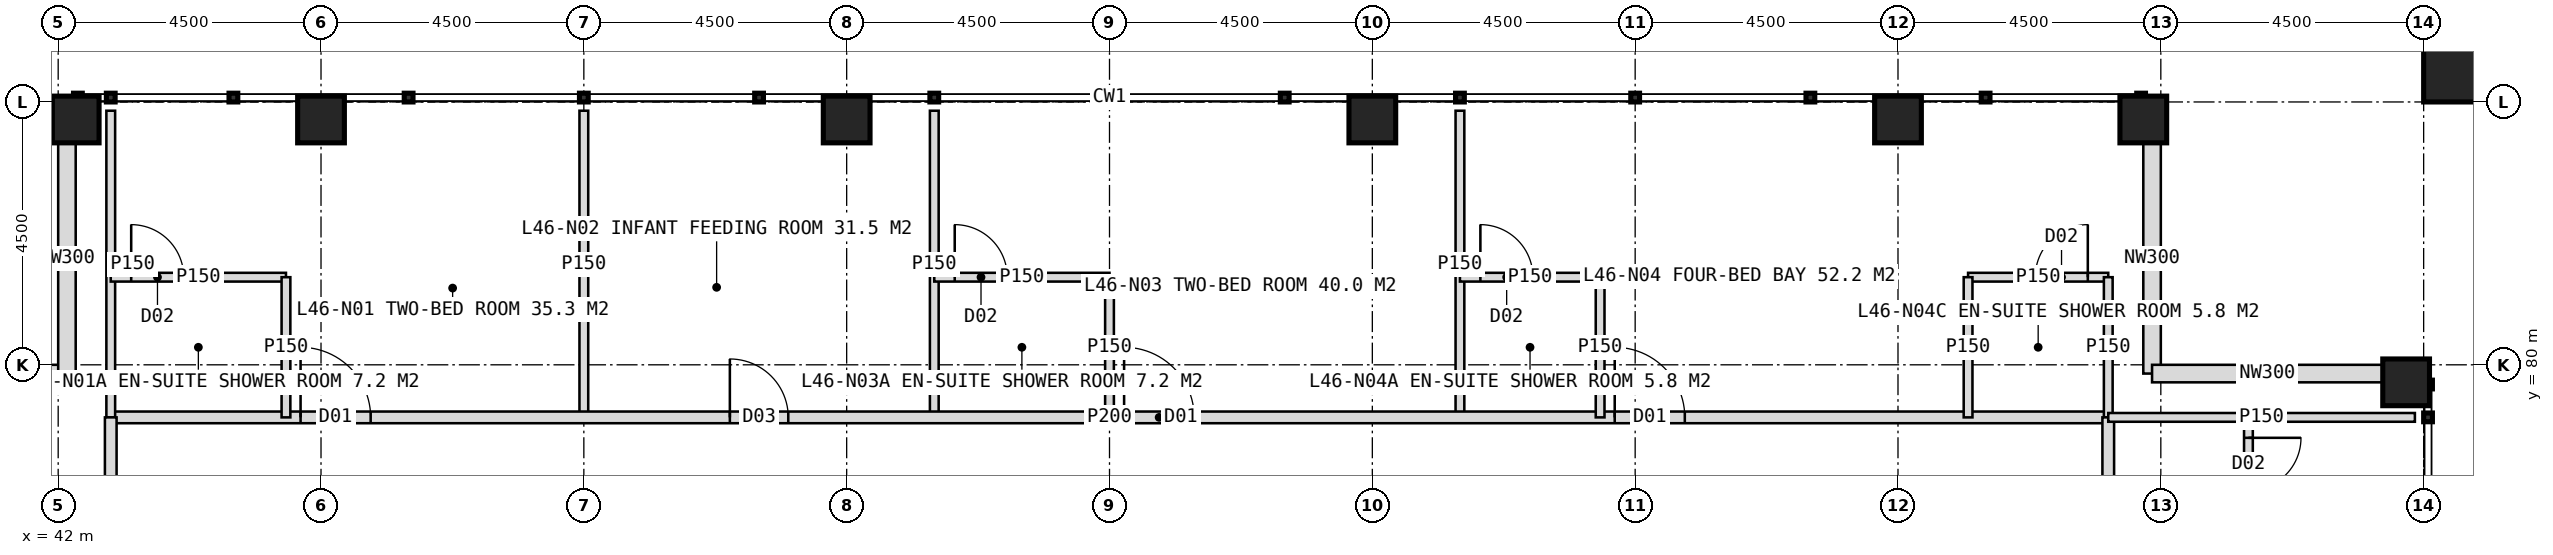
"""IFC4 building model, lengths in metres.
Left out: names, types, materials, properties, quantities, classifications, styles, units other than length and angle.
Written with IfcOpenShell. Run it as: python <this file> out.ifc"""

import sys

from ifc_helpers import new_model, si_unit, direction, frame, frame_2d, origin, origin_2d, place, context, subcontext, project, spatial, rectangle, hollow_rectangle, extrude, element, fill, save


model = new_model("IFC4")
c1 = context("Model", 3, precision=1e-05, world=origin(), true_north=direction((0.0, 1.0)))
c2 = subcontext(c1, "Body", "Model", "MODEL_VIEW")
j1 = project(units=[si_unit("LENGTHUNIT", "METRE"), si_unit("PLANEANGLEUNIT", "RADIAN")], contexts=[c1])
p1 = place(None, origin())
s1 = spatial("IfcSite", under=j1, at=p1, CompositionType="ELEMENT")
p2 = place(p1, origin())
s2 = spatial("IfcBuilding", under=s1, at=p2, CompositionType="ELEMENT")
p3 = place(p2, frame((0.0, 0.0, 193.0)))
s3 = spatial("IfcBuildingStorey", under=s2, at=p3, CompositionType="ELEMENT", Elevation=193.0)
for number, where, z_axis, x_axis in (
    (1, (42.3, 84.2, 0.0), (0.0, 0.0, 1.0), (1.0, 0.0, 0.0)),
    (2, (46.5, 84.2, 0.0), (0.0, 0.0, 1.0), (1.0, 0.0, 0.0)),
    (3, (55.5, 84.2, 0.0), (0.0, 0.0, 1.0), (1.0, 0.0, 0.0)),
    (4, (64.5, 84.2, 0.0), (0.0, 0.0, 1.0), (1.0, 0.0, 0.0)),
    (5, (73.5, 84.2, 0.0), (0.0, 0.0, 1.0), (1.0, 0.0, 0.0)),
    (6, (77.7, 84.2, 0.0), (0.0, 0.0, 1.0), (1.0, 0.0, 0.0)),
    (7, (82.2, 79.7, 0.0), (0.0, 0.0, 1.0), (1.0, 0.0, 0.0)),
):
    element("IfcColumn", number, at=place(p3, frame(where, z_axis=z_axis, x_axis=x_axis)), inside=s3, PredefinedType="COLUMN", context=c2, shape_type="SweptSolid", body=[
        extrude(hollow_rectangle(XDim=0.8, YDim=0.8, WallThickness=0.08, at=origin_2d()), origin(), (0.0, 0.0, 1.0), 4.0),
    ])
p4 = place(p3, frame((83.1, 85.1, 0.0), z_axis=(0.0, 0.0, 1.0), x_axis=(1.0, 0.0, 0.0)))
e8 = element("IfcColumn", 8, at=p4, inside=s3, PredefinedType="COLUMN", context=c2, shape_type="SweptSolid", body=[
    extrude(hollow_rectangle(XDim=1.2, YDim=1.2, WallThickness=0.07, at=origin_2d()), origin(), (0.0, 0.0, 1.0), 4.0),
])
for number, where, z_axis, x_axis in (
    (9, (77.85, 83.8, 0.0), (0.0, 0.0, 1.0), (0.0, -1.0, 0.0)),
    (10, (77.85, 79.85, 0.0), (0.0, 0.0, 1.0), (1.0, 0.0, 0.0)),
    (11, (38.2, 79.85, 0.0), (0.0, 0.0, 1.0), (1.0, 0.0, 0.0)),
    (12, (42.15, 79.85, 0.0), (0.0, 0.0, 1.0), (0.0, 1.0, 0.0)),
):
    element("IfcWall", number, at=place(p3, frame(where, z_axis=z_axis, x_axis=x_axis)), inside=s3, PredefinedType="ELEMENTEDWALL", context=c2, shape_type="SweptSolid", body=[
        extrude(rectangle(XDim=3.95, YDim=0.3, at=frame_2d((1.975, 0.0))), origin(), (0.0, 0.0, 1.0), 2.85),
    ])
for number, where, z_axis, x_axis in (
    (13, (51.0, 79.1, 0.0), (0.0, 0.0, 1.0), (0.0, 1.0, 0.0)),
    (14, (57.0, 79.1, 0.0), (0.0, 0.0, 1.0), (0.0, 1.0, 0.0)),
    (15, (66.0, 79.1, 0.0), (0.0, 0.0, 1.0), (0.0, 1.0, 0.0)),
):
    element("IfcWall", number, at=place(p3, frame(where, z_axis=z_axis, x_axis=x_axis)), inside=s3, PredefinedType="PARTITIONING", context=c2, shape_type="SweptSolid", body=[
        extrude(rectangle(XDim=5.25, YDim=0.15, at=frame_2d((2.625, 0.0))), origin(), (0.0, 0.0, 1.0), 3.75),
    ])
p5 = place(p3, frame((42.9, 79.1, 0.0), z_axis=(0.0, 0.0, 1.0), x_axis=(1.0, 0.0, 0.0)))
e16 = element("IfcWall", 16, at=p5, inside=s3, PredefinedType="PARTITIONING", context=c2, shape_type="SweptSolid", body=[
    extrude(rectangle(XDim=34.2, YDim=0.2, at=frame_2d((17.1, 0.0))), origin(), (0.0, 0.0, 1.0), 3.75),
])
p6 = place(p5, frame((3.25, 0.0, 0.0)))
e17 = element("IfcOpeningElement", 17, at=p6, cuts=e16, PredefinedType="OPENING", context=c2, shape_type="SweptSolid", body=[
    extrude(rectangle(XDim=1.2, YDim=2.2, at=frame_2d((0.6, 1.1))), frame((0.0, 0.11, 0.0), z_axis=(0.0, -1.0, 0.0), x_axis=(1.0, 0.0, 0.0)), (0.0, 0.0, 1.0), 0.22),
])
p7 = place(p5, frame((10.6, 0.0, 0.0)))
e18 = element("IfcOpeningElement", 18, at=p7, cuts=e16, PredefinedType="OPENING", context=c2, shape_type="SweptSolid", body=[
    extrude(rectangle(XDim=1.0, YDim=2.1, at=frame_2d((0.5, 1.05))), frame((0.0, 0.11, 0.0), z_axis=(0.0, -1.0, 0.0), x_axis=(1.0, 0.0, 0.0)), (0.0, 0.0, 1.0), 0.22),
])
p8 = place(p5, frame((17.35, 0.0, 0.0)))
e19 = element("IfcOpeningElement", 19, at=p8, cuts=e16, PredefinedType="OPENING", context=c2, shape_type="SweptSolid", body=[
    extrude(rectangle(XDim=1.2, YDim=2.2, at=frame_2d((0.6, 1.1))), frame((0.0, 0.11, 0.0), z_axis=(0.0, -1.0, 0.0), x_axis=(1.0, 0.0, 0.0)), (0.0, 0.0, 1.0), 0.22),
])
p9 = place(p5, frame((25.75, 0.0, 0.0)))
e20 = element("IfcOpeningElement", 20, at=p9, cuts=e16, PredefinedType="OPENING", context=c2, shape_type="SweptSolid", body=[
    extrude(rectangle(XDim=1.2, YDim=2.2, at=frame_2d((0.6, 1.1))), frame((0.0, 0.11, 0.0), z_axis=(0.0, -1.0, 0.0), x_axis=(1.0, 0.0, 0.0)), (0.0, 0.0, 1.0), 0.22),
])
p10 = place(p3, frame((42.9, 79.1, 0.0), z_axis=(0.0, 0.0, 1.0), x_axis=(0.0, 1.0, 0.0)))
e21 = element("IfcWall", 21, at=p10, inside=s3, PredefinedType="PARTITIONING", context=c2, shape_type="SweptSolid", body=[
    extrude(rectangle(XDim=5.25, YDim=0.15, at=frame_2d((2.625, 0.0))), origin(), (0.0, 0.0, 1.0), 3.75),
])
p11 = place(p3, frame((42.9, 81.5, 0.0), z_axis=(0.0, 0.0, 1.0), x_axis=(1.0, 0.0, 0.0)))
e22 = element("IfcWall", 22, at=p11, inside=s3, PredefinedType="PARTITIONING", context=c2, shape_type="SweptSolid", body=[
    extrude(rectangle(XDim=3.0, YDim=0.15, at=frame_2d((1.5, 0.0))), origin(), (0.0, 0.0, 1.0), 3.75),
])
p12 = place(p11, frame((0.35, 0.0, 0.0)))
e23 = element("IfcOpeningElement", 23, at=p12, cuts=e22, PredefinedType="OPENING", context=c2, shape_type="SweptSolid", body=[
    extrude(rectangle(XDim=0.9, YDim=2.1, at=frame_2d((0.45, 1.05))), frame((0.0, 0.085, 0.0), z_axis=(0.0, -1.0, 0.0), x_axis=(1.0, 0.0, 0.0)), (0.0, 0.0, 1.0), 0.17),
])
p13 = place(p3, frame((45.9, 79.1, 0.0), z_axis=(0.0, 0.0, 1.0), x_axis=(0.0, 1.0, 0.0)))
e24 = element("IfcWall", 24, at=p13, inside=s3, PredefinedType="PARTITIONING", context=c2, shape_type="SweptSolid", body=[
    extrude(rectangle(XDim=2.4, YDim=0.15, at=frame_2d((1.2, 0.0))), origin(), (0.0, 0.0, 1.0), 3.75),
])
p14 = place(p3, frame((57.0, 81.5, 0.0), z_axis=(0.0, 0.0, 1.0), x_axis=(1.0, 0.0, 0.0)))
e25 = element("IfcWall", 25, at=p14, inside=s3, PredefinedType="PARTITIONING", context=c2, shape_type="SweptSolid", body=[
    extrude(rectangle(XDim=3.0, YDim=0.15, at=frame_2d((1.5, 0.0))), origin(), (0.0, 0.0, 1.0), 3.75),
])
p15 = place(p14, frame((0.35, 0.0, 0.0)))
e26 = element("IfcOpeningElement", 26, at=p15, cuts=e25, PredefinedType="OPENING", context=c2, shape_type="SweptSolid", body=[
    extrude(rectangle(XDim=0.9, YDim=2.1, at=frame_2d((0.45, 1.05))), frame((0.0, 0.085, 0.0), z_axis=(0.0, -1.0, 0.0), x_axis=(1.0, 0.0, 0.0)), (0.0, 0.0, 1.0), 0.17),
])
p16 = place(p3, frame((60.0, 79.1, 0.0), z_axis=(0.0, 0.0, 1.0), x_axis=(0.0, 1.0, 0.0)))
e27 = element("IfcWall", 27, at=p16, inside=s3, PredefinedType="PARTITIONING", context=c2, shape_type="SweptSolid", body=[
    extrude(rectangle(XDim=2.4, YDim=0.15, at=frame_2d((1.2, 0.0))), origin(), (0.0, 0.0, 1.0), 2.95),
])
p17 = place(p3, frame((66.0, 81.5, 0.0), z_axis=(0.0, 0.0, 1.0), x_axis=(1.0, 0.0, 0.0)))
e28 = element("IfcWall", 28, at=p17, inside=s3, PredefinedType="PARTITIONING", context=c2, shape_type="SweptSolid", body=[
    extrude(rectangle(XDim=2.4, YDim=0.15, at=frame_2d((1.2, 0.0))), origin(), (0.0, 0.0, 1.0), 3.75),
])
p18 = place(p17, frame((0.35, 0.0, 0.0)))
e29 = element("IfcOpeningElement", 29, at=p18, cuts=e28, PredefinedType="OPENING", context=c2, shape_type="SweptSolid", body=[
    extrude(rectangle(XDim=0.9, YDim=2.1, at=frame_2d((0.45, 1.05))), frame((0.0, 0.085, 0.0), z_axis=(0.0, -1.0, 0.0), x_axis=(1.0, 0.0, 0.0)), (0.0, 0.0, 1.0), 0.17),
])
p19 = place(p3, frame((68.4, 79.1, 0.0), z_axis=(0.0, 0.0, 1.0), x_axis=(0.0, 1.0, 0.0)))
e30 = element("IfcWall", 30, at=p19, inside=s3, PredefinedType="PARTITIONING", context=c2, shape_type="SweptSolid", body=[
    extrude(rectangle(XDim=2.4, YDim=0.15, at=frame_2d((1.2, 0.0))), origin(), (0.0, 0.0, 1.0), 3.75),
])
p20 = place(p3, frame((74.7, 81.5, 0.0), z_axis=(0.0, 0.0, 1.0), x_axis=(1.0, 0.0, 0.0)))
e31 = element("IfcWall", 31, at=p20, inside=s3, PredefinedType="PARTITIONING", context=c2, shape_type="SweptSolid", body=[
    extrude(rectangle(XDim=2.4, YDim=0.15, at=frame_2d((1.2, 0.0))), origin(), (0.0, 0.0, 1.0), 3.75),
])
p21 = place(p20, frame((1.15, 0.0, 0.0)))
e32 = element("IfcOpeningElement", 32, at=p21, cuts=e31, PredefinedType="OPENING", context=c2, shape_type="SweptSolid", body=[
    extrude(rectangle(XDim=0.9, YDim=2.1, at=frame_2d((0.45, 1.05))), frame((0.0, 0.085, 0.0), z_axis=(0.0, -1.0, 0.0), x_axis=(1.0, 0.0, 0.0)), (0.0, 0.0, 1.0), 0.17),
])
for number, where, z_axis, x_axis in (
    (33, (74.7, 79.1, 0.0), (0.0, 0.0, 1.0), (0.0, 1.0, 0.0)),
    (34, (77.1, 79.1, 0.0), (0.0, 0.0, 1.0), (0.0, 1.0, 0.0)),
):
    element("IfcWall", number, at=place(p3, frame(where, z_axis=z_axis, x_axis=x_axis)), inside=s3, PredefinedType="PARTITIONING", context=c2, shape_type="SweptSolid", body=[
        extrude(rectangle(XDim=2.4, YDim=0.15, at=frame_2d((1.2, 0.0))), origin(), (0.0, 0.0, 1.0), 3.75),
    ])
p22 = place(p3, frame((42.9, 44.9, 0.0), z_axis=(0.0, 0.0, 1.0), x_axis=(0.0, 1.0, 0.0)))
e35 = element("IfcWall", 35, at=p22, inside=s3, PredefinedType="PARTITIONING", context=c2, shape_type="SweptSolid", body=[
    extrude(rectangle(XDim=34.2, YDim=0.2, at=frame_2d((17.1, 0.0))), origin(), (0.0, 0.0, 1.0), 3.75),
])
p23 = place(p22, frame((3.25, 0.0, 0.0)))
e36 = element("IfcOpeningElement", 36, at=p23, cuts=e35, PredefinedType="OPENING", context=c2, shape_type="SweptSolid", body=[
    extrude(rectangle(XDim=1.2, YDim=2.2, at=frame_2d((0.6, 1.1))), frame((0.0, 0.11, 0.0), z_axis=(0.0, -1.0, 0.0), x_axis=(1.0, 0.0, 0.0)), (0.0, 0.0, 1.0), 0.22),
])
p24 = place(p22, frame((11.35, 0.0, 0.0)))
e37 = element("IfcOpeningElement", 37, at=p24, cuts=e35, PredefinedType="OPENING", context=c2, shape_type="SweptSolid", body=[
    extrude(rectangle(XDim=1.2, YDim=2.2, at=frame_2d((0.6, 1.1))), frame((0.0, 0.11, 0.0), z_axis=(0.0, -1.0, 0.0), x_axis=(1.0, 0.0, 0.0)), (0.0, 0.0, 1.0), 0.22),
])
p25 = place(p22, frame((20.35, 0.0, 0.0)))
e38 = element("IfcOpeningElement", 38, at=p25, cuts=e35, PredefinedType="OPENING", context=c2, shape_type="SweptSolid", body=[
    extrude(rectangle(XDim=1.2, YDim=2.2, at=frame_2d((0.6, 1.1))), frame((0.0, 0.11, 0.0), z_axis=(0.0, -1.0, 0.0), x_axis=(1.0, 0.0, 0.0)), (0.0, 0.0, 1.0), 0.22),
])
p26 = place(p22, frame((29.35, 0.0, 0.0)))
e39 = element("IfcOpeningElement", 39, at=p26, cuts=e35, PredefinedType="OPENING", context=c2, shape_type="SweptSolid", body=[
    extrude(rectangle(XDim=1.2, YDim=2.2, at=frame_2d((0.6, 1.1))), frame((0.0, 0.11, 0.0), z_axis=(0.0, -1.0, 0.0), x_axis=(1.0, 0.0, 0.0)), (0.0, 0.0, 1.0), 0.22),
])
p27 = place(p3, frame((77.1, 79.1, 0.0), z_axis=(0.0, 0.0, 1.0), x_axis=(0.0, -1.0, 0.0)))
e40 = element("IfcWall", 40, at=p27, inside=s3, PredefinedType="PARTITIONING", context=c2, shape_type="SweptSolid", body=[
    extrude(rectangle(XDim=34.2, YDim=0.2, at=frame_2d((17.1, 0.0))), origin(), (0.0, 0.0, 1.0), 3.75),
])
p28 = place(p27, frame((3.25, 0.0, 0.0)))
e41 = element("IfcOpeningElement", 41, at=p28, cuts=e40, PredefinedType="OPENING", context=c2, shape_type="SweptSolid", body=[
    extrude(rectangle(XDim=1.2, YDim=2.2, at=frame_2d((0.6, 1.1))), frame((0.0, 0.11, 0.0), z_axis=(0.0, -1.0, 0.0), x_axis=(1.0, 0.0, 0.0)), (0.0, 0.0, 1.0), 0.22),
])
p29 = place(p27, frame((11.35, 0.0, 0.0)))
e42 = element("IfcOpeningElement", 42, at=p29, cuts=e40, PredefinedType="OPENING", context=c2, shape_type="SweptSolid", body=[
    extrude(rectangle(XDim=1.2, YDim=2.2, at=frame_2d((0.6, 1.1))), frame((0.0, 0.11, 0.0), z_axis=(0.0, -1.0, 0.0), x_axis=(1.0, 0.0, 0.0)), (0.0, 0.0, 1.0), 0.22),
])
p30 = place(p27, frame((19.75, 0.0, 0.0)))
e43 = element("IfcOpeningElement", 43, at=p30, cuts=e40, PredefinedType="OPENING", context=c2, shape_type="SweptSolid", body=[
    extrude(rectangle(XDim=1.2, YDim=2.2, at=frame_2d((0.6, 1.1))), frame((0.0, 0.11, 0.0), z_axis=(0.0, -1.0, 0.0), x_axis=(1.0, 0.0, 0.0)), (0.0, 0.0, 1.0), 0.22),
])
p31 = place(p27, frame((25.75, 0.0, 0.0)))
e44 = element("IfcOpeningElement", 44, at=p31, cuts=e40, PredefinedType="OPENING", context=c2, shape_type="SweptSolid", body=[
    extrude(rectangle(XDim=1.2, YDim=2.2, at=frame_2d((0.6, 1.1))), frame((0.0, 0.11, 0.0), z_axis=(0.0, -1.0, 0.0), x_axis=(1.0, 0.0, 0.0)), (0.0, 0.0, 1.0), 0.22),
])
p32 = place(p3, frame((77.1, 79.1, 0.0), z_axis=(0.0, 0.0, 1.0), x_axis=(1.0, 0.0, 0.0)))
e45 = element("IfcWall", 45, at=p32, inside=s3, PredefinedType="PARTITIONING", context=c2, shape_type="SweptSolid", body=[
    extrude(rectangle(XDim=5.25, YDim=0.15, at=frame_2d((2.625, 0.0))), origin(), (0.0, 0.0, 1.0), 3.75),
])
p33 = place(p3, frame((79.5, 79.1, 0.0), z_axis=(0.0, 0.0, 1.0), x_axis=(0.0, -1.0, 0.0)))
e46 = element("IfcWall", 46, at=p33, inside=s3, PredefinedType="PARTITIONING", context=c2, shape_type="SweptSolid", body=[
    extrude(rectangle(XDim=3.0, YDim=0.15, at=frame_2d((1.5, 0.0))), origin(), (0.0, 0.0, 1.0), 3.75),
])
p34 = place(p33, frame((0.35, 0.0, 0.0)))
e47 = element("IfcOpeningElement", 47, at=p34, cuts=e46, PredefinedType="OPENING", context=c2, shape_type="SweptSolid", body=[
    extrude(rectangle(XDim=0.9, YDim=2.1, at=frame_2d((0.45, 1.05))), frame((0.0, 0.085, 0.0), z_axis=(0.0, -1.0, 0.0), x_axis=(1.0, 0.0, 0.0)), (0.0, 0.0, 1.0), 0.17),
])
p35 = place(p6, origin())
e48 = element("IfcDoor", 48, at=p35, inside=s3, OperationType="SINGLE_SWING_LEFT", PredefinedType="DOOR", context=c2, shape_type="SweptSolid", body=[
    extrude(rectangle(XDim=1.2, YDim=2.2, at=frame_2d((0.6, 1.1))), frame((0.0, 0.025, 0.0), z_axis=(0.0, -1.0, 0.0), x_axis=(1.0, 0.0, 0.0)), (0.0, 0.0, 1.0), 0.05),
])
fill(e17, e48)
p36 = place(p12, origin())
e49 = element("IfcDoor", 49, at=p36, inside=s3, OperationType="SINGLE_SWING_LEFT", PredefinedType="DOOR", context=c2, shape_type="SweptSolid", body=[
    extrude(rectangle(XDim=0.9, YDim=2.1, at=frame_2d((0.45, 1.05))), frame((0.0, 0.025, 0.0), z_axis=(0.0, -1.0, 0.0), x_axis=(1.0, 0.0, 0.0)), (0.0, 0.0, 1.0), 0.05),
])
fill(e23, e49)
p37 = place(p7, origin())
e50 = element("IfcDoor", 50, at=p37, inside=s3, OperationType="SINGLE_SWING_LEFT", PredefinedType="DOOR", context=c2, shape_type="SweptSolid", body=[
    extrude(rectangle(XDim=1.0, YDim=2.1, at=frame_2d((0.5, 1.05))), frame((0.0, 0.025, 0.0), z_axis=(0.0, -1.0, 0.0), x_axis=(1.0, 0.0, 0.0)), (0.0, 0.0, 1.0), 0.05),
])
fill(e18, e50)
p38 = place(p8, origin())
e51 = element("IfcDoor", 51, at=p38, inside=s3, OperationType="SINGLE_SWING_LEFT", PredefinedType="DOOR", context=c2, shape_type="SweptSolid", body=[
    extrude(rectangle(XDim=1.2, YDim=2.2, at=frame_2d((0.6, 1.1))), frame((0.0, 0.025, 0.0), z_axis=(0.0, -1.0, 0.0), x_axis=(1.0, 0.0, 0.0)), (0.0, 0.0, 1.0), 0.05),
])
fill(e19, e51)
p39 = place(p15, origin())
e52 = element("IfcDoor", 52, at=p39, inside=s3, OperationType="SINGLE_SWING_LEFT", PredefinedType="DOOR", context=c2, shape_type="SweptSolid", body=[
    extrude(rectangle(XDim=0.9, YDim=2.1, at=frame_2d((0.45, 1.05))), frame((0.0, 0.025, 0.0), z_axis=(0.0, -1.0, 0.0), x_axis=(1.0, 0.0, 0.0)), (0.0, 0.0, 1.0), 0.05),
])
fill(e26, e52)
p40 = place(p9, origin())
e53 = element("IfcDoor", 53, at=p40, inside=s3, OperationType="SINGLE_SWING_LEFT", PredefinedType="DOOR", context=c2, shape_type="SweptSolid", body=[
    extrude(rectangle(XDim=1.2, YDim=2.2, at=frame_2d((0.6, 1.1))), frame((0.0, 0.025, 0.0), z_axis=(0.0, -1.0, 0.0), x_axis=(1.0, 0.0, 0.0)), (0.0, 0.0, 1.0), 0.05),
])
fill(e20, e53)
p41 = place(p18, origin())
e54 = element("IfcDoor", 54, at=p41, inside=s3, OperationType="SINGLE_SWING_LEFT", PredefinedType="DOOR", context=c2, shape_type="SweptSolid", body=[
    extrude(rectangle(XDim=0.9, YDim=2.1, at=frame_2d((0.45, 1.05))), frame((0.0, 0.025, 0.0), z_axis=(0.0, -1.0, 0.0), x_axis=(1.0, 0.0, 0.0)), (0.0, 0.0, 1.0), 0.05),
])
fill(e29, e54)
p42 = place(p21, origin())
e55 = element("IfcDoor", 55, at=p42, inside=s3, OperationType="SINGLE_SWING_RIGHT", PredefinedType="DOOR", context=c2, shape_type="SweptSolid", body=[
    extrude(rectangle(XDim=0.9, YDim=2.1, at=frame_2d((0.45, 1.05))), frame((0.0, 0.025, 0.0), z_axis=(0.0, -1.0, 0.0), x_axis=(1.0, 0.0, 0.0)), (0.0, 0.0, 1.0), 0.05),
])
fill(e32, e55)
p43 = place(p34, origin())
e56 = element("IfcDoor", 56, at=p43, inside=s3, OperationType="SINGLE_SWING_LEFT", PredefinedType="DOOR", context=c2, shape_type="SweptSolid", body=[
    extrude(rectangle(XDim=0.9, YDim=2.1, at=frame_2d((0.45, 1.05))), frame((0.0, 0.025, 0.0), z_axis=(0.0, -1.0, 0.0), x_axis=(1.0, 0.0, 0.0)), (0.0, 0.0, 1.0), 0.05),
])
fill(e47, e56)
save(model, sys.argv[1])
